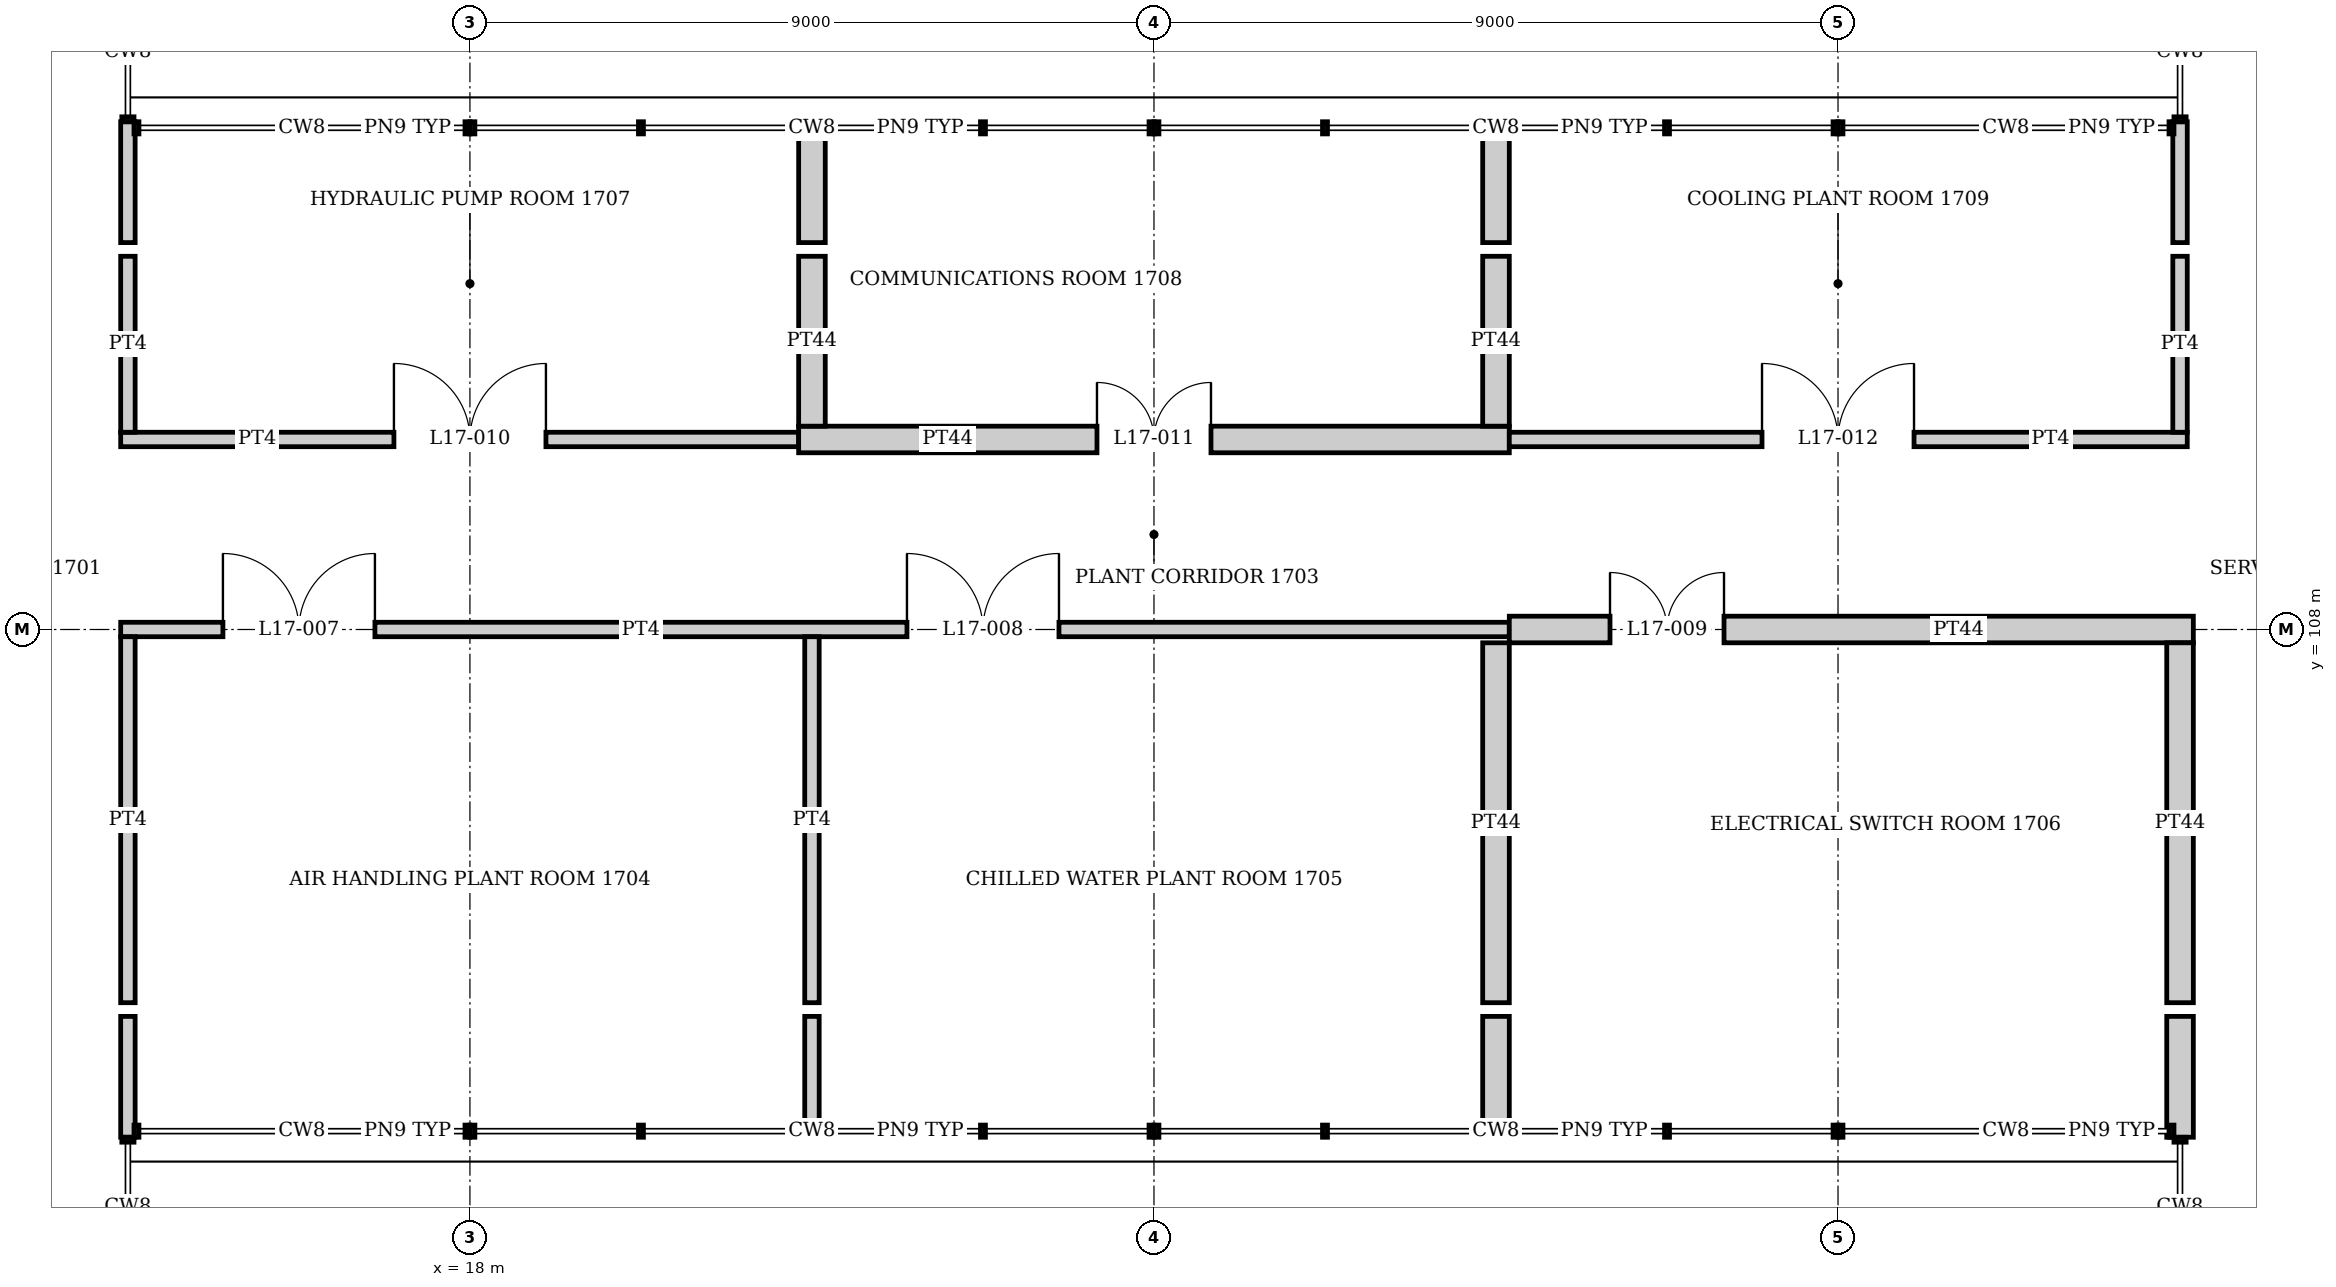
"""IFC4 building model, lengths in metres.
Left out: names, types, materials, properties, quantities, classifications, styles, units other than length and angle.
Written with IfcOpenShell. Run it as: python <this file> out.ifc"""

import sys

from ifc_helpers import new_model, si_unit, direction, frame, frame_2d, origin, place, context, subcontext, project, spatial, rectangle, extrude, element, fill, save


model = new_model("IFC4")
c1 = context("Model", 3, precision=1e-05, world=origin(), true_north=direction((0.0, 1.0)))
c2 = subcontext(c1, "Body", "Model", "MODEL_VIEW")
j1 = project(units=[si_unit("LENGTHUNIT", "METRE"), si_unit("PLANEANGLEUNIT", "RADIAN")], contexts=[c1])
p1 = place(None, origin())
s1 = spatial("IfcSite", under=j1, at=p1, CompositionType="ELEMENT")
p2 = place(p1, origin())
s2 = spatial("IfcBuilding", under=s1, at=p2, CompositionType="ELEMENT")
p3 = place(p2, frame((0.0, 0.0, 71.2)))
s3 = spatial("IfcBuildingStorey", under=s2, at=p3, CompositionType="ELEMENT", Elevation=71.2)
p4 = place(p3, frame((12.0, 101.0, 4.8), z_axis=(0.0, 0.0, 1.0), x_axis=(1.0, 0.0, 0.0)))
e1 = element("IfcWall", 1, at=p4, inside=s3, PredefinedType="SOLIDWALL", context=c2, shape_type="SweptSolid", body=[
    extrude(rectangle(XDim=30.0, YDim=0.18, at=frame_2d((15.0, 0.0))), origin(), (0.0, 0.0, 1.0), 1.6),
])
p5 = place(p3, frame((9.0, 103.0, 4.8), z_axis=(0.0, 0.0, 1.0), x_axis=(1.0, 0.0, 0.0)))
e2 = element("IfcWall", 2, at=p5, inside=s3, PredefinedType="SOLIDWALL", context=c2, shape_type="SweptSolid", body=[
    extrude(rectangle(XDim=36.0, YDim=0.18, at=frame_2d((18.0, 0.0))), origin(), (0.0, 0.0, 1.0), 3.0),
])
p6 = place(p3, frame((12.0, 115.0, 4.8), z_axis=(0.0, 0.0, 1.0), x_axis=(1.0, 0.0, 0.0)))
e3 = element("IfcWall", 3, at=p6, inside=s3, PredefinedType="SOLIDWALL", context=c2, shape_type="SweptSolid", body=[
    extrude(rectangle(XDim=30.0, YDim=0.18, at=frame_2d((15.0, 0.0))), origin(), (0.0, 0.0, 1.0), 1.6),
])
p7 = place(p3, frame((9.0, 113.0, 4.8), z_axis=(0.0, 0.0, 1.0), x_axis=(1.0, 0.0, 0.0)))
e4 = element("IfcWall", 4, at=p7, inside=s3, PredefinedType="SOLIDWALL", context=c2, shape_type="SweptSolid", body=[
    extrude(rectangle(XDim=36.0, YDim=0.18, at=frame_2d((18.0, 0.0))), origin(), (0.0, 0.0, 1.0), 3.0),
])
p8 = place(p3, frame((13.405, 108.0, 0.0), z_axis=(0.0, 0.0, 1.0), x_axis=(1.0, 0.0, 0.0)))
e5 = element("IfcWall", 5, at=p8, inside=s3, PredefinedType="PARTITIONING", context=c2, shape_type="SweptSolid", body=[
    extrude(rectangle(XDim=18.27, YDim=0.19, at=frame_2d((9.135, 0.0))), origin(), (0.0, 0.0, 1.0), 3.858),
])
p9 = place(p8, frame((1.345, 0.0, 0.0)))
e6 = element("IfcOpeningElement", 6, at=p9, cuts=e5, PredefinedType="OPENING", context=c2, shape_type="SweptSolid", body=[
    extrude(rectangle(XDim=2.0, YDim=2.7, at=frame_2d((1.0, 1.35))), frame((0.0, 0.105, 0.0), z_axis=(0.0, -1.0, 0.0), x_axis=(1.0, 0.0, 0.0)), (0.0, 0.0, 1.0), 0.21),
])
p10 = place(p8, frame((10.345, 0.0, 0.0)))
e7 = element("IfcOpeningElement", 7, at=p10, cuts=e5, PredefinedType="OPENING", context=c2, shape_type="SweptSolid", body=[
    extrude(rectangle(XDim=2.0, YDim=2.7, at=frame_2d((1.0, 1.35))), frame((0.0, 0.105, 0.0), z_axis=(0.0, -1.0, 0.0), x_axis=(1.0, 0.0, 0.0)), (0.0, 0.0, 1.0), 0.21),
])
p11 = place(p3, frame((31.675, 108.0, 0.0), z_axis=(0.0, 0.0, 1.0), x_axis=(1.0, 0.0, 0.0)))
e8 = element("IfcWall", 8, at=p11, inside=s3, PredefinedType="PARTITIONING", context=c2, shape_type="SweptSolid", body=[
    extrude(rectangle(XDim=9.0, YDim=0.35, at=frame_2d((4.5, 0.0))), origin(), (0.0, 0.0, 1.0), 3.858),
])
p12 = place(p11, frame((1.325, 0.0, 0.0)))
e9 = element("IfcOpeningElement", 9, at=p12, cuts=e8, PredefinedType="OPENING", context=c2, shape_type="SweptSolid", body=[
    extrude(rectangle(XDim=1.5, YDim=2.4, at=frame_2d((0.75, 1.2))), frame((0.0, 0.185, 0.0), z_axis=(0.0, -1.0, 0.0), x_axis=(1.0, 0.0, 0.0)), (0.0, 0.0, 1.0), 0.37),
])
p13 = place(p3, frame((13.405, 110.5, 0.0), z_axis=(0.0, 0.0, 1.0), x_axis=(1.0, 0.0, 0.0)))
e10 = element("IfcWall", 10, at=p13, inside=s3, PredefinedType="PARTITIONING", context=c2, shape_type="SweptSolid", body=[
    extrude(rectangle(XDim=8.92, YDim=0.19, at=frame_2d((4.46, 0.0))), origin(), (0.0, 0.0, 1.0), 3.858),
])
p14 = place(p13, frame((3.595, 0.0, 0.0)))
e11 = element("IfcOpeningElement", 11, at=p14, cuts=e10, PredefinedType="OPENING", context=c2, shape_type="SweptSolid", body=[
    extrude(rectangle(XDim=2.0, YDim=2.7, at=frame_2d((1.0, 1.35))), frame((0.0, 0.105, 0.0), z_axis=(0.0, -1.0, 0.0), x_axis=(1.0, 0.0, 0.0)), (0.0, 0.0, 1.0), 0.21),
])
p15 = place(p3, frame((22.325, 110.5, 0.0), z_axis=(0.0, 0.0, 1.0), x_axis=(1.0, 0.0, 0.0)))
e12 = element("IfcWall", 12, at=p15, inside=s3, PredefinedType="PARTITIONING", context=c2, shape_type="SweptSolid", body=[
    extrude(rectangle(XDim=9.35, YDim=0.35, at=frame_2d((4.675, 0.0))), origin(), (0.0, 0.0, 1.0), 3.858),
])
p16 = place(p15, frame((3.925, 0.0, 0.0)))
e13 = element("IfcOpeningElement", 13, at=p16, cuts=e12, PredefinedType="OPENING", context=c2, shape_type="SweptSolid", body=[
    extrude(rectangle(XDim=1.5, YDim=2.4, at=frame_2d((0.75, 1.2))), frame((0.0, 0.185, 0.0), z_axis=(0.0, -1.0, 0.0), x_axis=(1.0, 0.0, 0.0)), (0.0, 0.0, 1.0), 0.37),
])
p17 = place(p3, frame((31.675, 110.5, 0.0), z_axis=(0.0, 0.0, 1.0), x_axis=(1.0, 0.0, 0.0)))
e14 = element("IfcWall", 14, at=p17, inside=s3, PredefinedType="PARTITIONING", context=c2, shape_type="SweptSolid", body=[
    extrude(rectangle(XDim=8.92, YDim=0.19, at=frame_2d((4.46, 0.0))), origin(), (0.0, 0.0, 1.0), 3.858),
])
p18 = place(p17, frame((3.325, 0.0, 0.0)))
e15 = element("IfcOpeningElement", 15, at=p18, cuts=e14, PredefinedType="OPENING", context=c2, shape_type="SweptSolid", body=[
    extrude(rectangle(XDim=2.0, YDim=2.7, at=frame_2d((1.0, 1.35))), frame((0.0, 0.105, 0.0), z_axis=(0.0, -1.0, 0.0), x_axis=(1.0, 0.0, 0.0)), (0.0, 0.0, 1.0), 0.21),
])
p19 = place(p3, frame((13.5, 101.32, 0.0), z_axis=(0.0, 0.0, 1.0), x_axis=(0.0, 1.0, 0.0)))
e16 = element("IfcWall", 16, at=p19, inside=s3, PredefinedType="PARTITIONING", context=c2, shape_type="SweptSolid", body=[
    extrude(rectangle(XDim=1.59, YDim=0.19, at=frame_2d((0.795, 0.0))), origin(), (0.0, 0.0, 1.0), 3.858),
])
p20 = place(p3, frame((13.5, 103.09, 0.0), z_axis=(0.0, 0.0, 1.0), x_axis=(0.0, 1.0, 0.0)))
e17 = element("IfcWall", 17, at=p20, inside=s3, PredefinedType="PARTITIONING", context=c2, shape_type="SweptSolid", body=[
    extrude(rectangle(XDim=4.815, YDim=0.19, at=frame_2d((2.407, 0.0))), origin(), (0.0, 0.0, 1.0), 3.858),
])
p21 = place(p3, frame((13.5, 110.595, 0.0), z_axis=(0.0, 0.0, 1.0), x_axis=(0.0, 1.0, 0.0)))
e18 = element("IfcWall", 18, at=p21, inside=s3, PredefinedType="PARTITIONING", context=c2, shape_type="SweptSolid", body=[
    extrude(rectangle(XDim=2.315, YDim=0.19, at=frame_2d((1.157, 0.0))), origin(), (0.0, 0.0, 1.0), 3.858),
])
p22 = place(p3, frame((13.5, 113.09, 0.0), z_axis=(0.0, 0.0, 1.0), x_axis=(0.0, 1.0, 0.0)))
e19 = element("IfcWall", 19, at=p22, inside=s3, PredefinedType="PARTITIONING", context=c2, shape_type="SweptSolid", body=[
    extrude(rectangle(XDim=1.59, YDim=0.19, at=frame_2d((0.795, 0.0))), origin(), (0.0, 0.0, 1.0), 3.858),
])
p23 = place(p3, frame((22.5, 101.48, 0.0), z_axis=(0.0, 0.0, 1.0), x_axis=(0.0, 1.0, 0.0)))
e20 = element("IfcWall", 20, at=p23, inside=s3, PredefinedType="PARTITIONING", context=c2, shape_type="SweptSolid", body=[
    extrude(rectangle(XDim=1.43, YDim=0.19, at=frame_2d((0.715, 0.0))), origin(), (0.0, 0.0, 1.0), 3.858),
])
p24 = place(p3, frame((22.5, 103.09, 0.0), z_axis=(0.0, 0.0, 1.0), x_axis=(0.0, 1.0, 0.0)))
e21 = element("IfcWall", 21, at=p24, inside=s3, PredefinedType="PARTITIONING", context=c2, shape_type="SweptSolid", body=[
    extrude(rectangle(XDim=4.815, YDim=0.19, at=frame_2d((2.407, 0.0))), origin(), (0.0, 0.0, 1.0), 3.858),
])
p25 = place(p3, frame((22.5, 110.675, 0.0), z_axis=(0.0, 0.0, 1.0), x_axis=(0.0, 1.0, 0.0)))
e22 = element("IfcWall", 22, at=p25, inside=s3, PredefinedType="PARTITIONING", context=c2, shape_type="SweptSolid", body=[
    extrude(rectangle(XDim=2.235, YDim=0.35, at=frame_2d((1.117, 0.0))), origin(), (0.0, 0.0, 1.0), 3.858),
])
for number, where, z_axis, x_axis in (
    (23, (22.5, 113.09, 0.0), (0.0, 0.0, 1.0), (0.0, 1.0, 0.0)),
    (24, (31.5, 101.48, 0.0), (0.0, 0.0, 1.0), (0.0, 1.0, 0.0)),
):
    element("IfcWall", number, at=place(p3, frame(where, z_axis=z_axis, x_axis=x_axis)), inside=s3, PredefinedType="PARTITIONING", context=c2, shape_type="SweptSolid", body=[
        extrude(rectangle(XDim=1.43, YDim=0.35, at=frame_2d((0.715, 0.0))), origin(), (0.0, 0.0, 1.0), 3.858),
    ])
p26 = place(p3, frame((31.5, 103.09, 0.0), z_axis=(0.0, 0.0, 1.0), x_axis=(0.0, 1.0, 0.0)))
e25 = element("IfcWall", 25, at=p26, inside=s3, PredefinedType="PARTITIONING", context=c2, shape_type="SweptSolid", body=[
    extrude(rectangle(XDim=4.735, YDim=0.35, at=frame_2d((2.367, 0.0))), origin(), (0.0, 0.0, 1.0), 3.858),
])
p27 = place(p3, frame((31.5, 110.675, 0.0), z_axis=(0.0, 0.0, 1.0), x_axis=(0.0, 1.0, 0.0)))
e26 = element("IfcWall", 26, at=p27, inside=s3, PredefinedType="PARTITIONING", context=c2, shape_type="SweptSolid", body=[
    extrude(rectangle(XDim=2.235, YDim=0.35, at=frame_2d((1.117, 0.0))), origin(), (0.0, 0.0, 1.0), 3.858),
])
p28 = place(p3, frame((31.5, 113.09, 0.0), z_axis=(0.0, 0.0, 1.0), x_axis=(0.0, 1.0, 0.0)))
e27 = element("IfcWall", 27, at=p28, inside=s3, PredefinedType="PARTITIONING", context=c2, shape_type="SweptSolid", body=[
    extrude(rectangle(XDim=1.43, YDim=0.35, at=frame_2d((0.715, 0.0))), origin(), (0.0, 0.0, 1.0), 3.858),
])
p29 = place(p3, frame((40.5, 101.32, 0.0), z_axis=(0.0, 0.0, 1.0), x_axis=(0.0, 1.0, 0.0)))
e28 = element("IfcWall", 28, at=p29, inside=s3, PredefinedType="PARTITIONING", context=c2, shape_type="SweptSolid", body=[
    extrude(rectangle(XDim=1.59, YDim=0.35, at=frame_2d((0.795, 0.0))), origin(), (0.0, 0.0, 1.0), 3.858),
])
p30 = place(p3, frame((40.5, 103.09, 0.0), z_axis=(0.0, 0.0, 1.0), x_axis=(0.0, 1.0, 0.0)))
e29 = element("IfcWall", 29, at=p30, inside=s3, PredefinedType="PARTITIONING", context=c2, shape_type="SweptSolid", body=[
    extrude(rectangle(XDim=4.735, YDim=0.35, at=frame_2d((2.367, 0.0))), origin(), (0.0, 0.0, 1.0), 3.858),
])
p31 = place(p3, frame((40.5, 110.595, 0.0), z_axis=(0.0, 0.0, 1.0), x_axis=(0.0, 1.0, 0.0)))
e30 = element("IfcWall", 30, at=p31, inside=s3, PredefinedType="PARTITIONING", context=c2, shape_type="SweptSolid", body=[
    extrude(rectangle(XDim=2.315, YDim=0.19, at=frame_2d((1.157, 0.0))), origin(), (0.0, 0.0, 1.0), 3.858),
])
p32 = place(p3, frame((40.5, 113.09, 0.0), z_axis=(0.0, 0.0, 1.0), x_axis=(0.0, 1.0, 0.0)))
e31 = element("IfcWall", 31, at=p32, inside=s3, PredefinedType="PARTITIONING", context=c2, shape_type="SweptSolid", body=[
    extrude(rectangle(XDim=1.59, YDim=0.19, at=frame_2d((0.795, 0.0))), origin(), (0.0, 0.0, 1.0), 3.858),
])
p33 = place(p9, origin())
e32 = element("IfcDoor", 32, at=p33, inside=s3, OperationType="DOUBLE_DOOR_SINGLE_SWING", PredefinedType="DOOR", context=c2, shape_type="SweptSolid", body=[
    extrude(rectangle(XDim=2.0, YDim=2.7, at=frame_2d((1.0, 1.35))), frame((0.0, 0.025, 0.0), z_axis=(0.0, -1.0, 0.0), x_axis=(1.0, 0.0, 0.0)), (0.0, 0.0, 1.0), 0.05),
])
fill(e6, e32)
p34 = place(p10, origin())
e33 = element("IfcDoor", 33, at=p34, inside=s3, OperationType="DOUBLE_DOOR_SINGLE_SWING", PredefinedType="DOOR", context=c2, shape_type="SweptSolid", body=[
    extrude(rectangle(XDim=2.0, YDim=2.7, at=frame_2d((1.0, 1.35))), frame((0.0, 0.025, 0.0), z_axis=(0.0, -1.0, 0.0), x_axis=(1.0, 0.0, 0.0)), (0.0, 0.0, 1.0), 0.05),
])
fill(e7, e33)
p35 = place(p12, origin())
e34 = element("IfcDoor", 34, at=p35, inside=s3, OperationType="DOUBLE_DOOR_SINGLE_SWING", PredefinedType="DOOR", context=c2, shape_type="SweptSolid", body=[
    extrude(rectangle(XDim=1.5, YDim=2.4, at=frame_2d((0.75, 1.2))), frame((0.0, 0.025, 0.0), z_axis=(0.0, -1.0, 0.0), x_axis=(1.0, 0.0, 0.0)), (0.0, 0.0, 1.0), 0.05),
])
fill(e9, e34)
p36 = place(p14, origin())
e35 = element("IfcDoor", 35, at=p36, inside=s3, OperationType="DOUBLE_DOOR_SINGLE_SWING", PredefinedType="DOOR", context=c2, shape_type="SweptSolid", body=[
    extrude(rectangle(XDim=2.0, YDim=2.7, at=frame_2d((1.0, 1.35))), frame((0.0, 0.025, 0.0), z_axis=(0.0, -1.0, 0.0), x_axis=(1.0, 0.0, 0.0)), (0.0, 0.0, 1.0), 0.05),
])
fill(e11, e35)
p37 = place(p16, origin())
e36 = element("IfcDoor", 36, at=p37, inside=s3, OperationType="DOUBLE_DOOR_SINGLE_SWING", PredefinedType="DOOR", context=c2, shape_type="SweptSolid", body=[
    extrude(rectangle(XDim=1.5, YDim=2.4, at=frame_2d((0.75, 1.2))), frame((0.0, 0.025, 0.0), z_axis=(0.0, -1.0, 0.0), x_axis=(1.0, 0.0, 0.0)), (0.0, 0.0, 1.0), 0.05),
])
fill(e13, e36)
p38 = place(p18, origin())
e37 = element("IfcDoor", 37, at=p38, inside=s3, OperationType="DOUBLE_DOOR_SINGLE_SWING", PredefinedType="DOOR", context=c2, shape_type="SweptSolid", body=[
    extrude(rectangle(XDim=2.0, YDim=2.7, at=frame_2d((1.0, 1.35))), frame((0.0, 0.025, 0.0), z_axis=(0.0, -1.0, 0.0), x_axis=(1.0, 0.0, 0.0)), (0.0, 0.0, 1.0), 0.05),
])
fill(e15, e37)
save(model, sys.argv[1])
